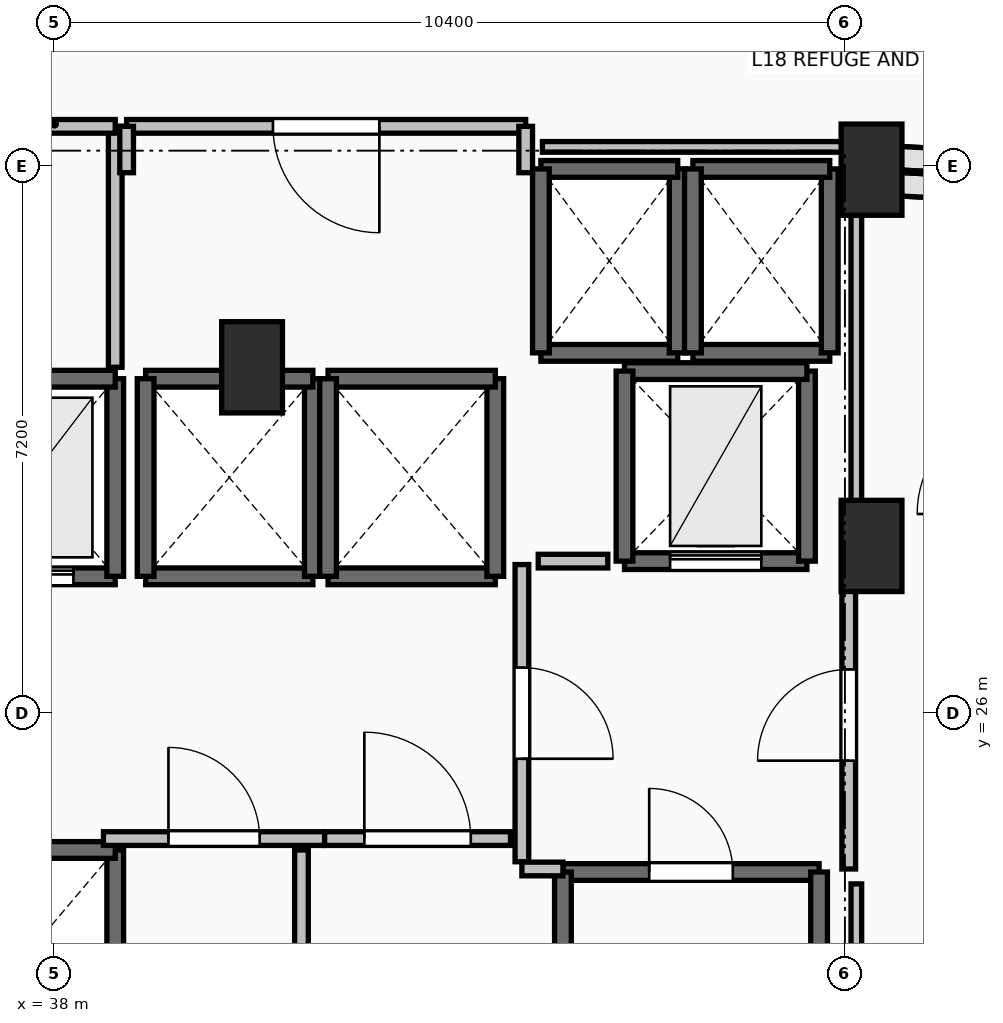
"""IFC4 building model, lengths in metres.
Left out: names, types, materials, properties, quantities, classifications, styles, units other than length and angle.
Written with IfcOpenShell. Run it as: python <this file> out.ifc"""

import sys

from ifc_helpers import new_model, si_unit, direction, frame, frame_2d, origin, origin_2d, place, context, subcontext, project, spatial, rectangle, extrude, element, fill, save


model = new_model("IFC4")
c1 = context("Model", 3, precision=1e-05, world=origin(), true_north=direction((0.0, 1.0)))
c2 = subcontext(c1, "Body", "Model", "MODEL_VIEW")
j1 = project(units=[si_unit("LENGTHUNIT", "METRE"), si_unit("PLANEANGLEUNIT", "RADIAN")], contexts=[c1])
p1 = place(None, origin())
s1 = spatial("IfcSite", under=j1, at=p1, CompositionType="ELEMENT")
p2 = place(p1, origin())
s2 = spatial("IfcBuilding", under=s1, at=p2, CompositionType="ELEMENT")
p3 = place(p2, frame((0.0, 0.0, 69.5)))
s3 = spatial("IfcBuildingStorey", under=s2, at=p3, CompositionType="ELEMENT", Elevation=69.5)
for number, where, z_axis, x_axis in (
    (1, (48.75, 33.15, 0.0), (0.0, 0.0, 1.0), (1.0, 0.0, 0.0)),
    (2, (48.75, 28.2, 0.0), (0.0, 0.0, 1.0), (1.0, 0.0, 0.0)),
    (3, (40.6, 30.55, 0.0), (0.0, 0.0, 1.0), (1.0, 0.0, 0.0)),
):
    element("IfcColumn", number, at=place(p3, frame(where, z_axis=z_axis, x_axis=x_axis)), inside=s3, PredefinedType="PILASTER", context=c2, shape_type="SweptSolid", body=[
        extrude(rectangle(XDim=0.8, YDim=1.2, at=origin_2d()), origin(), (0.0, 0.0, 1.0), 4.8),
    ])
p4 = place(p3, frame((44.69, 23.91, 0.0), z_axis=(0.0, 0.0, 1.0), x_axis=(1.0, 0.0, 0.0)))
e4 = element("IfcWall", 4, at=p4, inside=s3, PredefinedType="SOLIDWALL", context=c2, shape_type="SweptSolid", body=[
    extrude(rectangle(XDim=3.37, YDim=0.22, at=frame_2d((1.685, 0.0))), origin(), (0.0, 0.0, 1.0), 4.5),
])
p5 = place(p4, frame((1.135, 0.0, 0.0)))
e5 = element("IfcOpeningElement", 5, at=p5, cuts=e4, PredefinedType="OPENING", context=c2, shape_type="SweptSolid", body=[
    extrude(rectangle(XDim=1.1, YDim=2.15, at=frame_2d((0.55, 1.075))), frame((0.0, 0.125, 0.0), z_axis=(0.0, -1.0, 0.0), x_axis=(1.0, 0.0, 0.0)), (0.0, 0.0, 1.0), 0.25),
])
for number, where, z_axis, x_axis in (
    (6, (48.06, 23.91, 0.0), (0.0, 0.0, 1.0), (0.0, -1.0, 0.0)),
    (7, (44.69, 16.49, 0.0), (0.0, 0.0, 1.0), (0.0, 1.0, 0.0)),
):
    element("IfcWall", number, at=place(p3, frame(where, z_axis=z_axis, x_axis=x_axis)), inside=s3, PredefinedType="SOLIDWALL", context=c2, shape_type="SweptSolid", body=[
        extrude(rectangle(XDim=7.42, YDim=0.22, at=frame_2d((3.71, 0.0))), origin(), (0.0, 0.0, 1.0), 4.5),
    ])
p6 = place(p3, frame((36.6, 27.8, 0.0), z_axis=(0.0, 0.0, 1.0), x_axis=(1.0, 0.0, 0.0)))
e8 = element("IfcWall", 8, at=p6, inside=s3, PredefinedType="SOLIDWALL", context=c2, shape_type="SweptSolid", body=[
    extrude(rectangle(XDim=2.2, YDim=0.22, at=frame_2d((1.1, 0.0))), origin(), (0.0, 0.0, 1.0), 4.5),
])
p7 = place(p6, frame((0.55, 0.0, 0.0)))
e9 = element("IfcOpeningElement", 9, at=p7, cuts=e8, PredefinedType="OPENING", context=c2, shape_type="SweptSolid", body=[
    extrude(rectangle(XDim=1.1, YDim=2.2, at=frame_2d((0.55, 1.1))), frame((0.0, 0.125, 0.0), z_axis=(0.0, -1.0, 0.0), x_axis=(1.0, 0.0, 0.0)), (0.0, 0.0, 1.0), 0.25),
])
p8 = place(p3, frame((38.8, 27.8, 0.0), z_axis=(0.0, 0.0, 1.0), x_axis=(0.0, 1.0, 0.0)))
e10 = element("IfcWall", 10, at=p8, inside=s3, PredefinedType="SOLIDWALL", context=c2, shape_type="SweptSolid", body=[
    extrude(rectangle(XDim=2.6, YDim=0.22, at=frame_2d((1.3, 0.0))), origin(), (0.0, 0.0, 1.0), 4.5),
])
p9 = place(p3, frame((38.8, 30.4, 0.0), z_axis=(0.0, 0.0, 1.0), x_axis=(-1.0, 0.0, 0.0)))
e11 = element("IfcWall", 11, at=p9, inside=s3, PredefinedType="SOLIDWALL", context=c2, shape_type="SweptSolid", body=[
    extrude(rectangle(XDim=2.2, YDim=0.22, at=frame_2d((1.1, 0.0))), origin(), (0.0, 0.0, 1.0), 4.5),
])
p10 = place(p3, frame((38.8, 21.6, 0.0), z_axis=(0.0, 0.0, 1.0), x_axis=(0.0, 1.0, 0.0)))
e12 = element("IfcWall", 12, at=p10, inside=s3, PredefinedType="SOLIDWALL", context=c2, shape_type="SweptSolid", body=[
    extrude(rectangle(XDim=2.6, YDim=0.22, at=frame_2d((1.3, 0.0))), origin(), (0.0, 0.0, 1.0), 4.5),
])
for number, where, z_axis, x_axis in (
    (13, (38.8, 24.2, 0.0), (0.0, 0.0, 1.0), (-1.0, 0.0, 0.0)),
    (14, (39.2, 27.8, 0.0), (0.0, 0.0, 1.0), (1.0, 0.0, 0.0)),
):
    element("IfcWall", number, at=place(p3, frame(where, z_axis=z_axis, x_axis=x_axis)), inside=s3, PredefinedType="SOLIDWALL", context=c2, shape_type="SweptSolid", body=[
        extrude(rectangle(XDim=2.2, YDim=0.22, at=frame_2d((1.1, 0.0))), origin(), (0.0, 0.0, 1.0), 4.5),
    ])
p11 = place(p3, frame((41.4, 27.8, 0.0), z_axis=(0.0, 0.0, 1.0), x_axis=(0.0, 1.0, 0.0)))
e15 = element("IfcWall", 15, at=p11, inside=s3, PredefinedType="SOLIDWALL", context=c2, shape_type="SweptSolid", body=[
    extrude(rectangle(XDim=2.6, YDim=0.22, at=frame_2d((1.3, 0.0))), origin(), (0.0, 0.0, 1.0), 4.5),
])
p12 = place(p3, frame((41.4, 30.4, 0.0), z_axis=(0.0, 0.0, 1.0), x_axis=(-1.0, 0.0, 0.0)))
e16 = element("IfcWall", 16, at=p12, inside=s3, PredefinedType="SOLIDWALL", context=c2, shape_type="SweptSolid", body=[
    extrude(rectangle(XDim=2.2, YDim=0.22, at=frame_2d((1.1, 0.0))), origin(), (0.0, 0.0, 1.0), 4.5),
])
p13 = place(p3, frame((39.2, 30.4, 0.0), z_axis=(0.0, 0.0, 1.0), x_axis=(0.0, -1.0, 0.0)))
e17 = element("IfcWall", 17, at=p13, inside=s3, PredefinedType="SOLIDWALL", context=c2, shape_type="SweptSolid", body=[
    extrude(rectangle(XDim=2.6, YDim=0.22, at=frame_2d((1.3, 0.0))), origin(), (0.0, 0.0, 1.0), 4.5),
])
p14 = place(p3, frame((41.6, 27.8, 0.0), z_axis=(0.0, 0.0, 1.0), x_axis=(1.0, 0.0, 0.0)))
e18 = element("IfcWall", 18, at=p14, inside=s3, PredefinedType="SOLIDWALL", context=c2, shape_type="SweptSolid", body=[
    extrude(rectangle(XDim=2.2, YDim=0.22, at=frame_2d((1.1, 0.0))), origin(), (0.0, 0.0, 1.0), 4.5),
])
p15 = place(p3, frame((43.8, 27.8, 0.0), z_axis=(0.0, 0.0, 1.0), x_axis=(0.0, 1.0, 0.0)))
e19 = element("IfcWall", 19, at=p15, inside=s3, PredefinedType="SOLIDWALL", context=c2, shape_type="SweptSolid", body=[
    extrude(rectangle(XDim=2.6, YDim=0.22, at=frame_2d((1.3, 0.0))), origin(), (0.0, 0.0, 1.0), 4.5),
])
p16 = place(p3, frame((43.8, 30.4, 0.0), z_axis=(0.0, 0.0, 1.0), x_axis=(-1.0, 0.0, 0.0)))
e20 = element("IfcWall", 20, at=p16, inside=s3, PredefinedType="SOLIDWALL", context=c2, shape_type="SweptSolid", body=[
    extrude(rectangle(XDim=2.2, YDim=0.22, at=frame_2d((1.1, 0.0))), origin(), (0.0, 0.0, 1.0), 4.5),
])
p17 = place(p3, frame((41.6, 30.4, 0.0), z_axis=(0.0, 0.0, 1.0), x_axis=(0.0, -1.0, 0.0)))
e21 = element("IfcWall", 21, at=p17, inside=s3, PredefinedType="SOLIDWALL", context=c2, shape_type="SweptSolid", body=[
    extrude(rectangle(XDim=2.6, YDim=0.22, at=frame_2d((1.3, 0.0))), origin(), (0.0, 0.0, 1.0), 4.5),
])
p18 = place(p3, frame((44.4, 30.74, 0.0), z_axis=(0.0, 0.0, 1.0), x_axis=(1.0, 0.0, 0.0)))
e22 = element("IfcWall", 22, at=p18, inside=s3, PredefinedType="SOLIDWALL", context=c2, shape_type="SweptSolid", body=[
    extrude(rectangle(XDim=1.8, YDim=0.22, at=frame_2d((0.9, 0.0))), origin(), (0.0, 0.0, 1.0), 4.5),
])
p19 = place(p3, frame((46.2, 30.74, 0.0), z_axis=(0.0, 0.0, 1.0), x_axis=(0.0, 1.0, 0.0)))
e23 = element("IfcWall", 23, at=p19, inside=s3, PredefinedType="SOLIDWALL", context=c2, shape_type="SweptSolid", body=[
    extrude(rectangle(XDim=2.42, YDim=0.22, at=frame_2d((1.21, 0.0))), origin(), (0.0, 0.0, 1.0), 4.5),
])
p20 = place(p3, frame((46.2, 33.16, 0.0), z_axis=(0.0, 0.0, 1.0), x_axis=(-1.0, 0.0, 0.0)))
e24 = element("IfcWall", 24, at=p20, inside=s3, PredefinedType="SOLIDWALL", context=c2, shape_type="SweptSolid", body=[
    extrude(rectangle(XDim=1.8, YDim=0.22, at=frame_2d((0.9, 0.0))), origin(), (0.0, 0.0, 1.0), 4.5),
])
p21 = place(p3, frame((44.4, 33.16, 0.0), z_axis=(0.0, 0.0, 1.0), x_axis=(0.0, -1.0, 0.0)))
e25 = element("IfcWall", 25, at=p21, inside=s3, PredefinedType="SOLIDWALL", context=c2, shape_type="SweptSolid", body=[
    extrude(rectangle(XDim=2.42, YDim=0.22, at=frame_2d((1.21, 0.0))), origin(), (0.0, 0.0, 1.0), 4.5),
])
p22 = place(p3, frame((46.4, 30.74, 0.0), z_axis=(0.0, 0.0, 1.0), x_axis=(1.0, 0.0, 0.0)))
e26 = element("IfcWall", 26, at=p22, inside=s3, PredefinedType="SOLIDWALL", context=c2, shape_type="SweptSolid", body=[
    extrude(rectangle(XDim=1.8, YDim=0.22, at=frame_2d((0.9, 0.0))), origin(), (0.0, 0.0, 1.0), 4.5),
])
p23 = place(p3, frame((48.2, 30.74, 0.0), z_axis=(0.0, 0.0, 1.0), x_axis=(0.0, 1.0, 0.0)))
e27 = element("IfcWall", 27, at=p23, inside=s3, PredefinedType="SOLIDWALL", context=c2, shape_type="SweptSolid", body=[
    extrude(rectangle(XDim=2.42, YDim=0.22, at=frame_2d((1.21, 0.0))), origin(), (0.0, 0.0, 1.0), 4.5),
])
p24 = place(p3, frame((48.2, 33.16, 0.0), z_axis=(0.0, 0.0, 1.0), x_axis=(-1.0, 0.0, 0.0)))
e28 = element("IfcWall", 28, at=p24, inside=s3, PredefinedType="SOLIDWALL", context=c2, shape_type="SweptSolid", body=[
    extrude(rectangle(XDim=1.8, YDim=0.22, at=frame_2d((0.9, 0.0))), origin(), (0.0, 0.0, 1.0), 4.5),
])
p25 = place(p3, frame((46.4, 33.16, 0.0), z_axis=(0.0, 0.0, 1.0), x_axis=(0.0, -1.0, 0.0)))
e29 = element("IfcWall", 29, at=p25, inside=s3, PredefinedType="SOLIDWALL", context=c2, shape_type="SweptSolid", body=[
    extrude(rectangle(XDim=2.42, YDim=0.22, at=frame_2d((1.21, 0.0))), origin(), (0.0, 0.0, 1.0), 4.5),
])
p26 = place(p3, frame((45.5, 28.0, 0.0), z_axis=(0.0, 0.0, 1.0), x_axis=(1.0, 0.0, 0.0)))
e30 = element("IfcWall", 30, at=p26, inside=s3, PredefinedType="SHEAR", context=c2, shape_type="SweptSolid", body=[
    extrude(rectangle(XDim=2.4, YDim=0.22, at=frame_2d((1.2, 0.0))), origin(), (0.0, 0.0, 1.0), 4.5),
])
p27 = place(p26, frame((0.6, 0.0, 0.0)))
e31 = element("IfcOpeningElement", 31, at=p27, cuts=e30, PredefinedType="OPENING", context=c2, shape_type="SweptSolid", body=[
    extrude(rectangle(XDim=1.2, YDim=2.2, at=frame_2d((0.6, 1.1))), frame((0.0, 0.125, 0.0), z_axis=(0.0, -1.0, 0.0), x_axis=(1.0, 0.0, 0.0)), (0.0, 0.0, 1.0), 0.25),
])
p28 = place(p3, frame((47.9, 28.0, 0.0), z_axis=(0.0, 0.0, 1.0), x_axis=(0.0, 1.0, 0.0)))
e32 = element("IfcWall", 32, at=p28, inside=s3, PredefinedType="SHEAR", context=c2, shape_type="SweptSolid", body=[
    extrude(rectangle(XDim=2.5, YDim=0.22, at=frame_2d((1.25, 0.0))), origin(), (0.0, 0.0, 1.0), 4.5),
])
p29 = place(p3, frame((47.9, 30.5, 0.0), z_axis=(0.0, 0.0, 1.0), x_axis=(-1.0, 0.0, 0.0)))
e33 = element("IfcWall", 33, at=p29, inside=s3, PredefinedType="SHEAR", context=c2, shape_type="SweptSolid", body=[
    extrude(rectangle(XDim=2.4, YDim=0.22, at=frame_2d((1.2, 0.0))), origin(), (0.0, 0.0, 1.0), 4.5),
])
p30 = place(p3, frame((45.5, 30.5, 0.0), z_axis=(0.0, 0.0, 1.0), x_axis=(0.0, -1.0, 0.0)))
e34 = element("IfcWall", 34, at=p30, inside=s3, PredefinedType="SHEAR", context=c2, shape_type="SweptSolid", body=[
    extrude(rectangle(XDim=2.5, YDim=0.22, at=frame_2d((1.25, 0.0))), origin(), (0.0, 0.0, 1.0), 4.5),
])
p31 = place(p3, frame((44.15, 27.955, 0.0), z_axis=(0.0, 0.0, 1.0), x_axis=(0.0, -1.0, 0.0)))
e35 = element("IfcWall", 35, at=p31, inside=s3, PredefinedType="PARTITIONING", context=c2, shape_type="SweptSolid", body=[
    extrude(rectangle(XDim=3.91, YDim=0.18, at=frame_2d((1.955, 0.0))), origin(), (0.0, 0.0, 1.0), 4.5),
])
p32 = place(p31, frame((1.355, 0.0, 0.0)))
e36 = element("IfcOpeningElement", 36, at=p32, cuts=e35, PredefinedType="OPENING", context=c2, shape_type="SweptSolid", body=[
    extrude(rectangle(XDim=1.2, YDim=2.15, at=frame_2d((0.6, 1.075))), frame((0.0, 0.105, 0.0), z_axis=(0.0, -1.0, 0.0), x_axis=(1.0, 0.0, 0.0)), (0.0, 0.0, 1.0), 0.21),
])
p33 = place(p3, frame((44.15, 23.95, 0.0), z_axis=(0.0, 0.0, 1.0), x_axis=(1.0, 0.0, 0.0)))
e37 = element("IfcWall", 37, at=p33, inside=s3, PredefinedType="PARTITIONING", context=c2, shape_type="SweptSolid", body=[
    extrude(rectangle(XDim=0.54, YDim=0.18, at=frame_2d((0.27, 0.0))), origin(), (0.0, 0.0, 1.0), 4.5),
])
p34 = place(p3, frame((48.45, 23.95, 0.0), z_axis=(0.0, 0.0, 1.0), x_axis=(0.0, 1.0, 0.0)))
e38 = element("IfcWall", 38, at=p34, inside=s3, PredefinedType="PARTITIONING", context=c2, shape_type="SweptSolid", body=[
    extrude(rectangle(XDim=4.05, YDim=0.18, at=frame_2d((2.025, 0.0))), origin(), (0.0, 0.0, 1.0), 3.482),
])
p35 = place(p34, frame((1.425, 0.0, 0.0)))
e39 = element("IfcOpeningElement", 39, at=p35, cuts=e38, PredefinedType="OPENING", context=c2, shape_type="SweptSolid", body=[
    extrude(rectangle(XDim=1.2, YDim=2.15, at=frame_2d((0.6, 1.075))), frame((0.0, 0.105, 0.0), z_axis=(0.0, -1.0, 0.0), x_axis=(1.0, 0.0, 0.0)), (0.0, 0.0, 1.0), 0.21),
])
p36 = place(p3, frame((38.645, 24.35, 0.0), z_axis=(0.0, 0.0, 1.0), x_axis=(1.0, 0.0, 0.0)))
e40 = element("IfcWall", 40, at=p36, inside=s3, PredefinedType="PARTITIONING", context=c2, shape_type="SweptSolid", body=[
    extrude(rectangle(XDim=2.91, YDim=0.18, at=frame_2d((1.455, 0.0))), origin(), (0.0, 0.0, 1.0), 4.5),
])
p37 = place(p36, frame((0.855, 0.0, 0.0)))
e41 = element("IfcOpeningElement", 41, at=p37, cuts=e40, PredefinedType="OPENING", context=c2, shape_type="SweptSolid", body=[
    extrude(rectangle(XDim=1.2, YDim=2.15, at=frame_2d((0.6, 1.075))), frame((0.0, 0.105, 0.0), z_axis=(0.0, -1.0, 0.0), x_axis=(1.0, 0.0, 0.0)), (0.0, 0.0, 1.0), 0.21),
])
p38 = place(p3, frame((41.555, 24.35, 0.0), z_axis=(0.0, 0.0, 1.0), x_axis=(1.0, 0.0, 0.0)))
e42 = element("IfcWall", 42, at=p38, inside=s3, PredefinedType="PARTITIONING", context=c2, shape_type="SweptSolid", body=[
    extrude(rectangle(XDim=2.445, YDim=0.18, at=frame_2d((1.223, 0.0))), origin(), (0.0, 0.0, 1.0), 4.5),
])
p39 = place(p38, frame((0.522, 0.0, 0.0)))
e43 = element("IfcOpeningElement", 43, at=p39, cuts=e42, PredefinedType="OPENING", context=c2, shape_type="SweptSolid", body=[
    extrude(rectangle(XDim=1.4, YDim=2.2, at=frame_2d((0.7, 1.1))), frame((0.0, 0.105, 0.0), z_axis=(0.0, -1.0, 0.0), x_axis=(1.0, 0.0, 0.0)), (0.0, 0.0, 1.0), 0.21),
])
p40 = place(p3, frame((41.25, 19.105, 0.0), z_axis=(0.0, 0.0, 1.0), x_axis=(0.0, 1.0, 0.0)))
e44 = element("IfcWall", 44, at=p40, inside=s3, PredefinedType="PARTITIONING", context=c2, shape_type="SweptSolid", body=[
    extrude(rectangle(XDim=5.095, YDim=0.18, at=frame_2d((2.547, 0.0))), origin(), (0.0, 0.0, 1.0), 4.5),
])
p41 = place(p40, frame((1.847, 0.0, 0.0)))
e45 = element("IfcOpeningElement", 45, at=p41, cuts=e44, PredefinedType="OPENING", context=c2, shape_type="SweptSolid", body=[
    extrude(rectangle(XDim=1.4, YDim=2.2, at=frame_2d((0.7, 1.1))), frame((0.0, 0.105, 0.0), z_axis=(0.0, -1.0, 0.0), x_axis=(1.0, 0.0, 0.0)), (0.0, 0.0, 1.0), 0.21),
])
p42 = place(p3, frame((38.8, 30.55, 0.0), z_axis=(0.0, 0.0, 1.0), x_axis=(0.0, 1.0, 0.0)))
e46 = element("IfcWall", 46, at=p42, inside=s3, PredefinedType="PARTITIONING", context=c2, shape_type="SweptSolid", body=[
    extrude(rectangle(XDim=3.17, YDim=0.18, at=frame_2d((1.585, 0.0))), origin(), (0.0, 0.0, 1.0), 3.482),
])
p43 = place(p3, frame((38.8, 33.72, 0.0), z_axis=(0.0, 0.0, 1.0), x_axis=(-1.0, 0.0, 0.0)))
e47 = element("IfcWall", 47, at=p43, inside=s3, PredefinedType="PARTITIONING", context=c2, shape_type="SweptSolid", body=[
    extrude(rectangle(XDim=5.2, YDim=0.18, at=frame_2d((2.6, 0.0))), origin(), (0.0, 0.0, 1.0), 4.5),
])
p44 = place(p43, frame((1.9, 0.0, 0.0)))
e48 = element("IfcOpeningElement", 48, at=p44, cuts=e47, PredefinedType="OPENING", context=c2, shape_type="SweptSolid", body=[
    extrude(rectangle(XDim=1.4, YDim=2.2, at=frame_2d((0.7, 1.1))), frame((0.0, 0.105, 0.0), z_axis=(0.0, -1.0, 0.0), x_axis=(1.0, 0.0, 0.0)), (0.0, 0.0, 1.0), 0.21),
])
p45 = place(p3, frame((44.2, 33.72, 0.0), z_axis=(0.0, 0.0, 1.0), x_axis=(-1.0, 0.0, 0.0)))
e49 = element("IfcWall", 49, at=p45, inside=s3, PredefinedType="PARTITIONING", context=c2, shape_type="SweptSolid", body=[
    extrude(rectangle(XDim=5.25, YDim=0.18, at=frame_2d((2.625, 0.0))), origin(), (0.0, 0.0, 1.0), 4.5),
])
p46 = place(p45, frame((1.925, 0.0, 0.0)))
e50 = element("IfcOpeningElement", 50, at=p46, cuts=e49, PredefinedType="OPENING", context=c2, shape_type="SweptSolid", body=[
    extrude(rectangle(XDim=1.4, YDim=2.2, at=frame_2d((0.7, 1.1))), frame((0.0, 0.105, 0.0), z_axis=(0.0, -1.0, 0.0), x_axis=(1.0, 0.0, 0.0)), (0.0, 0.0, 1.0), 0.21),
])
for number, where, z_axis, x_axis in (
    (51, (38.95, 33.72, 0.0), (0.0, 0.0, 1.0), (0.0, -1.0, 0.0)),
    (52, (44.2, 33.11, 0.0), (0.0, 0.0, 1.0), (0.0, 1.0, 0.0)),
):
    element("IfcWall", number, at=place(p3, frame(where, z_axis=z_axis, x_axis=x_axis)), inside=s3, PredefinedType="PARTITIONING", context=c2, shape_type="SweptSolid", body=[
        extrude(rectangle(XDim=0.61, YDim=0.18, at=frame_2d((0.305, 0.0))), origin(), (0.0, 0.0, 1.0), 4.5),
    ])
p47 = place(p3, frame((45.28, 28.0, 0.0), z_axis=(0.0, 0.0, 1.0), x_axis=(-1.0, 0.0, 0.0)))
e53 = element("IfcWall", 53, at=p47, inside=s3, PredefinedType="PARTITIONING", context=c2, shape_type="SweptSolid", body=[
    extrude(rectangle(XDim=0.915, YDim=0.18, at=frame_2d((0.458, 0.0))), origin(), (0.0, 0.0, 1.0), 4.5),
])
p48 = place(p3, frame((44.42, 33.45, 0.0), z_axis=(0.0, 0.0, 1.0), x_axis=(1.0, 0.0, 0.0)))
e54 = element("IfcWall", 54, at=p48, inside=s3, PredefinedType="PARTITIONING", context=c2, shape_type="SweptSolid", body=[
    extrude(rectangle(XDim=4.13, YDim=0.14, at=frame_2d((2.065, 0.0))), origin(), (0.0, 0.0, 1.0), 3.482),
])
p49 = place(p3, frame((48.55, 33.45, 0.0), z_axis=(0.0, 0.0, 1.0), x_axis=(0.0, -1.0, 0.0)))
e55 = element("IfcWall", 55, at=p49, inside=s3, PredefinedType="PARTITIONING", context=c2, shape_type="SweptSolid", body=[
    extrude(rectangle(XDim=5.254, YDim=0.14, at=frame_2d((2.627, 0.0))), origin(), (0.0, 0.0, 1.0), 3.482),
])
p50 = place(p3, frame((48.55, 23.754, 0.0), z_axis=(0.0, 0.0, 1.0), x_axis=(0.0, -1.0, 0.0)))
e56 = element("IfcWall", 56, at=p50, inside=s3, PredefinedType="PARTITIONING", context=c2, shape_type="SweptSolid", body=[
    extrude(rectangle(XDim=7.514, YDim=0.14, at=frame_2d((3.757, 0.0))), origin(), (0.0, 0.0, 1.0), 3.482),
])
p51 = place(p5, origin())
e57 = element("IfcDoor", 57, at=p51, inside=s3, OperationType="SINGLE_SWING_LEFT", PredefinedType="DOOR", context=c2, shape_type="SweptSolid", body=[
    extrude(rectangle(XDim=1.1, YDim=2.15, at=frame_2d((0.55, 1.075))), frame((0.0, 0.025, 0.0), z_axis=(0.0, -1.0, 0.0), x_axis=(1.0, 0.0, 0.0)), (0.0, 0.0, 1.0), 0.05),
])
fill(e5, e57)
p52 = place(p7, origin())
e58 = element("IfcDoor", 58, at=p52, inside=s3, OperationType="SLIDING_TO_LEFT", PredefinedType="DOOR", context=c2, shape_type="SweptSolid", body=[
    extrude(rectangle(XDim=1.1, YDim=2.2, at=frame_2d((0.55, 1.1))), frame((0.0, 0.025, 0.0), z_axis=(0.0, -1.0, 0.0), x_axis=(1.0, 0.0, 0.0)), (0.0, 0.0, 1.0), 0.05),
])
fill(e9, e58)
p53 = place(p27, origin())
e59 = element("IfcDoor", 59, at=p53, inside=s3, OperationType="SLIDING_TO_LEFT", PredefinedType="DOOR", context=c2, shape_type="SweptSolid", body=[
    extrude(rectangle(XDim=1.2, YDim=2.2, at=frame_2d((0.6, 1.1))), frame((0.0, 0.025, 0.0), z_axis=(0.0, -1.0, 0.0), x_axis=(1.0, 0.0, 0.0)), (0.0, 0.0, 1.0), 0.05),
])
fill(e31, e59)
p54 = place(p32, origin())
e60 = element("IfcDoor", 60, at=p54, inside=s3, OperationType="SINGLE_SWING_RIGHT", PredefinedType="DOOR", context=c2, shape_type="SweptSolid", body=[
    extrude(rectangle(XDim=1.2, YDim=2.15, at=frame_2d((0.6, 1.075))), frame((0.0, 0.025, 0.0), z_axis=(0.0, -1.0, 0.0), x_axis=(1.0, 0.0, 0.0)), (0.0, 0.0, 1.0), 0.05),
])
fill(e36, e60)
p55 = place(p35, origin())
e61 = element("IfcDoor", 61, at=p55, inside=s3, OperationType="SINGLE_SWING_LEFT", PredefinedType="DOOR", context=c2, shape_type="SweptSolid", body=[
    extrude(rectangle(XDim=1.2, YDim=2.15, at=frame_2d((0.6, 1.075))), frame((0.0, 0.025, 0.0), z_axis=(0.0, -1.0, 0.0), x_axis=(1.0, 0.0, 0.0)), (0.0, 0.0, 1.0), 0.05),
])
fill(e39, e61)
p56 = place(p37, origin())
e62 = element("IfcDoor", 62, at=p56, inside=s3, OperationType="SINGLE_SWING_LEFT", PredefinedType="DOOR", context=c2, shape_type="SweptSolid", body=[
    extrude(rectangle(XDim=1.2, YDim=2.15, at=frame_2d((0.6, 1.075))), frame((0.0, 0.025, 0.0), z_axis=(0.0, -1.0, 0.0), x_axis=(1.0, 0.0, 0.0)), (0.0, 0.0, 1.0), 0.05),
])
fill(e41, e62)
p57 = place(p39, origin())
e63 = element("IfcDoor", 63, at=p57, inside=s3, OperationType="DOUBLE_SWING_LEFT", PredefinedType="DOOR", context=c2, shape_type="SweptSolid", body=[
    extrude(rectangle(XDim=1.4, YDim=2.2, at=frame_2d((0.7, 1.1))), frame((0.0, 0.025, 0.0), z_axis=(0.0, -1.0, 0.0), x_axis=(1.0, 0.0, 0.0)), (0.0, 0.0, 1.0), 0.05),
])
fill(e43, e63)
p58 = place(p46, origin())
e64 = element("IfcDoor", 64, at=p58, inside=s3, OperationType="DOUBLE_SWING_LEFT", PredefinedType="DOOR", context=c2, shape_type="SweptSolid", body=[
    extrude(rectangle(XDim=1.4, YDim=2.2, at=frame_2d((0.7, 1.1))), frame((0.0, 0.025, 0.0), z_axis=(0.0, -1.0, 0.0), x_axis=(1.0, 0.0, 0.0)), (0.0, 0.0, 1.0), 0.05),
])
fill(e50, e64)
save(model, sys.argv[1])
